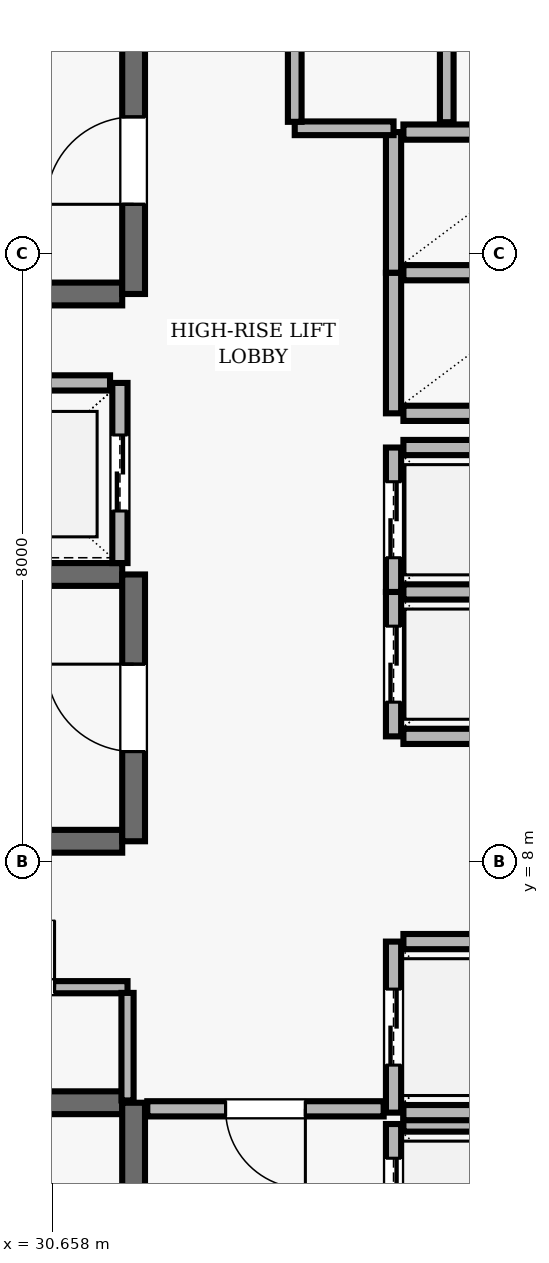
"""IFC4 building model, lengths in metres.
Left out: names, types, materials, properties, quantities, classifications, styles, units other than length and angle.
Written with IfcOpenShell. Run it as: python <this file> out.ifc"""

import sys

from ifc_helpers import new_model, si_unit, direction, frame, frame_2d, origin, place, context, subcontext, project, spatial, rectangle, extrude, element, fill, save


model = new_model("IFC4")
c1 = context("Model", 3, precision=1e-05, world=origin(), true_north=direction((0.0, 1.0)))
c2 = subcontext(c1, "Body", "Model", "MODEL_VIEW")
j1 = project(units=[si_unit("LENGTHUNIT", "METRE"), si_unit("PLANEANGLEUNIT", "RADIAN")], contexts=[c1])
p1 = place(None, origin())
s1 = spatial("IfcSite", under=j1, at=p1, CompositionType="ELEMENT")
p2 = place(p1, origin())
s2 = spatial("IfcBuilding", under=s1, at=p2, CompositionType="ELEMENT")
p3 = place(p2, frame((0.0, 0.0, 271.6)))
s3 = spatial("IfcBuildingStorey", under=s2, at=p3, CompositionType="ELEMENT", Elevation=271.6)
p4 = place(p3, frame((31.58, 4.83, 0.0), z_axis=(0.0, 0.0, 1.0), x_axis=(-1.0, 0.0, 0.0)))
e1 = element("IfcWall", 1, at=p4, inside=s3, PredefinedType="SHEAR", context=c2, shape_type="SweptSolid", body=[
    extrude(rectangle(XDim=8.36, YDim=0.3, at=frame_2d((4.18, 0.0))), origin(), (0.0, 0.0, 1.0), 3.69),
])
p5 = place(p3, frame((31.73, 0.96, 0.0), z_axis=(0.0, 0.0, 1.0), x_axis=(0.0, 1.0, 0.0)))
e2 = element("IfcWall", 2, at=p5, inside=s3, PredefinedType="SHEAR", context=c2, shape_type="SweptSolid", body=[
    extrude(rectangle(XDim=3.87, YDim=0.3, at=frame_2d((1.935, 0.0))), origin(), (0.0, 0.0, 1.0), 3.69),
])
p6 = place(p5, frame((1.54, 0.0, 0.0)))
e3 = element("IfcOpeningElement", 3, at=p6, cuts=e2, PredefinedType="OPENING", context=c2, shape_type="SweptSolid", body=[
    extrude(rectangle(XDim=1.15, YDim=2.15, at=frame_2d((0.575, 1.075))), frame((0.0, 0.16, 0.0), z_axis=(0.0, -1.0, 0.0), x_axis=(1.0, 0.0, 0.0)), (0.0, 0.0, 1.0), 0.32),
])
p7 = place(p3, frame((23.22, 15.47, 0.0), z_axis=(0.0, 0.0, 1.0), x_axis=(1.0, 0.0, 0.0)))
e4 = element("IfcWall", 4, at=p7, inside=s3, PredefinedType="SHEAR", context=c2, shape_type="SweptSolid", body=[
    extrude(rectangle(XDim=8.36, YDim=0.3, at=frame_2d((4.18, 0.0))), origin(), (0.0, 0.0, 1.0), 3.69),
])
p8 = place(p3, frame((31.73, 15.47, 0.0), z_axis=(0.0, 0.0, 1.0), x_axis=(0.0, 1.0, 0.0)))
e5 = element("IfcWall", 5, at=p8, inside=s3, PredefinedType="SHEAR", context=c2, shape_type="SweptSolid", body=[
    extrude(rectangle(XDim=3.51, YDim=0.3, at=frame_2d((1.755, 0.0))), origin(), (0.0, 0.0, 1.0), 3.69),
])
p9 = place(p8, frame((1.18, 0.0, 0.0)))
e6 = element("IfcOpeningElement", 6, at=p9, cuts=e5, PredefinedType="OPENING", context=c2, shape_type="SweptSolid", body=[
    extrude(rectangle(XDim=1.15, YDim=2.15, at=frame_2d((0.575, 1.075))), frame((0.0, 0.16, 0.0), z_axis=(0.0, -1.0, 0.0), x_axis=(1.0, 0.0, 0.0)), (0.0, 0.0, 1.0), 0.32),
])
for number, where, z_axis, x_axis in (
    (7, (31.58, 11.78, 0.0), (0.0, 0.0, 1.0), (-1.0, 0.0, 0.0)),
    (8, (23.22, 8.27, 0.0), (0.0, 0.0, 1.0), (1.0, 0.0, 0.0)),
):
    element("IfcWall", number, at=place(p3, frame(where, z_axis=z_axis, x_axis=x_axis)), inside=s3, PredefinedType="SHEAR", context=c2, shape_type="SweptSolid", body=[
        extrude(rectangle(XDim=8.36, YDim=0.3, at=frame_2d((4.18, 0.0))), origin(), (0.0, 0.0, 1.0), 3.69),
    ])
p10 = place(p3, frame((31.73, 8.27, 0.0), z_axis=(0.0, 0.0, 1.0), x_axis=(0.0, 1.0, 0.0)))
e9 = element("IfcWall", 9, at=p10, inside=s3, PredefinedType="SHEAR", context=c2, shape_type="SweptSolid", body=[
    extrude(rectangle(XDim=3.51, YDim=0.3, at=frame_2d((1.755, 0.0))), origin(), (0.0, 0.0, 1.0), 3.69),
])
p11 = place(p10, frame((1.18, 0.0, 0.0)))
e10 = element("IfcOpeningElement", 10, at=p11, cuts=e9, PredefinedType="OPENING", context=c2, shape_type="SweptSolid", body=[
    extrude(rectangle(XDim=1.15, YDim=2.15, at=frame_2d((0.575, 1.075))), frame((0.0, 0.16, 0.0), z_axis=(0.0, -1.0, 0.0), x_axis=(1.0, 0.0, 0.0)), (0.0, 0.0, 1.0), 0.32),
])
p12 = place(p3, frame((35.15, 4.55, 0.0), z_axis=(0.0, 0.0, 1.0), x_axis=(0.0, -1.0, 0.0)))
e11 = element("IfcWall", 11, at=p12, inside=s3, PredefinedType="SOLIDWALL", context=c2, shape_type="SweptSolid", body=[
    extrude(rectangle(XDim=2.1, YDim=0.2, at=frame_2d((1.05, 0.0))), origin(), (0.0, 0.0, 1.0), 3.69),
])
p13 = place(p12, frame((0.45, 0.0, 0.0)))
e12 = element("IfcOpeningElement", 12, at=p13, cuts=e11, PredefinedType="OPENING", context=c2, shape_type="SweptSolid", body=[
    extrude(rectangle(XDim=1.2, YDim=2.15, at=frame_2d((0.6, 1.075))), frame((0.0, 0.11, 0.0), z_axis=(0.0, -1.0, 0.0), x_axis=(1.0, 0.0, 0.0)), (0.0, 0.0, 1.0), 0.22),
])
p14 = place(p3, frame((37.42, 4.55, 0.0), z_axis=(0.0, 0.0, 1.0), x_axis=(-1.0, 0.0, 0.0)))
e13 = element("IfcWall", 13, at=p14, inside=s3, PredefinedType="SOLIDWALL", context=c2, shape_type="SweptSolid", body=[
    extrude(rectangle(XDim=2.14, YDim=0.2, at=frame_2d((1.07, 0.0))), origin(), (0.0, 0.0, 1.0), 3.69),
])
p15 = place(p3, frame((35.15, 6.95, 0.0), z_axis=(0.0, 0.0, 1.0), x_axis=(0.0, -1.0, 0.0)))
e14 = element("IfcWall", 14, at=p15, inside=s3, PredefinedType="SOLIDWALL", context=c2, shape_type="SweptSolid", body=[
    extrude(rectangle(XDim=2.25, YDim=0.2, at=frame_2d((1.125, 0.0))), origin(), (0.0, 0.0, 1.0), 3.69),
])
p16 = place(p15, frame((0.625, 0.0, 0.0)))
e15 = element("IfcOpeningElement", 15, at=p16, cuts=e14, PredefinedType="OPENING", context=c2, shape_type="SweptSolid", body=[
    extrude(rectangle(XDim=1.0, YDim=2.1, at=frame_2d((0.5, 1.05))), frame((0.0, 0.11, 0.0), z_axis=(0.0, -1.0, 0.0), x_axis=(1.0, 0.0, 0.0)), (0.0, 0.0, 1.0), 0.22),
])
for number, where, z_axis, x_axis in (
    (16, (35.28, 4.7, 0.0), (0.0, 0.0, 1.0), (1.0, 0.0, 0.0)),
    (17, (37.42, 6.95, 0.0), (0.0, 0.0, 1.0), (-1.0, 0.0, 0.0)),
):
    element("IfcWall", number, at=place(p3, frame(where, z_axis=z_axis, x_axis=x_axis)), inside=s3, PredefinedType="SOLIDWALL", context=c2, shape_type="SweptSolid", body=[
        extrude(rectangle(XDim=2.14, YDim=0.2, at=frame_2d((1.07, 0.0))), origin(), (0.0, 0.0, 1.0), 3.69),
    ])
p17 = place(p3, frame((35.15, 11.55, 0.0), z_axis=(0.0, 0.0, 1.0), x_axis=(0.0, -1.0, 0.0)))
e18 = element("IfcWall", 18, at=p17, inside=s3, PredefinedType="SOLIDWALL", context=c2, shape_type="SweptSolid", body=[
    extrude(rectangle(XDim=1.9, YDim=0.2, at=frame_2d((0.95, 0.0))), origin(), (0.0, 0.0, 1.0), 3.69),
])
p18 = place(p17, frame((0.45, 0.0, 0.0)))
e19 = element("IfcOpeningElement", 19, at=p18, cuts=e18, PredefinedType="OPENING", context=c2, shape_type="SweptSolid", body=[
    extrude(rectangle(XDim=1.0, YDim=2.1, at=frame_2d((0.5, 1.05))), frame((0.0, 0.11, 0.0), z_axis=(0.0, -1.0, 0.0), x_axis=(1.0, 0.0, 0.0)), (0.0, 0.0, 1.0), 0.22),
])
for number, where, z_axis, x_axis in (
    (20, (35.28, 9.65, 0.0), (0.0, 0.0, 1.0), (1.0, 0.0, 0.0)),
    (21, (37.42, 11.55, 0.0), (0.0, 0.0, 1.0), (-1.0, 0.0, 0.0)),
):
    element("IfcWall", number, at=place(p3, frame(where, z_axis=z_axis, x_axis=x_axis)), inside=s3, PredefinedType="SOLIDWALL", context=c2, shape_type="SweptSolid", body=[
        extrude(rectangle(XDim=2.14, YDim=0.2, at=frame_2d((1.07, 0.0))), origin(), (0.0, 0.0, 1.0), 3.69),
    ])
p19 = place(p3, frame((35.15, 13.45, 0.0), z_axis=(0.0, 0.0, 1.0), x_axis=(0.0, -1.0, 0.0)))
e22 = element("IfcWall", 22, at=p19, inside=s3, PredefinedType="SOLIDWALL", context=c2, shape_type="SweptSolid", body=[
    extrude(rectangle(XDim=1.9, YDim=0.2, at=frame_2d((0.95, 0.0))), origin(), (0.0, 0.0, 1.0), 3.69),
])
p20 = place(p19, frame((0.45, 0.0, 0.0)))
e23 = element("IfcOpeningElement", 23, at=p20, cuts=e22, PredefinedType="OPENING", context=c2, shape_type="SweptSolid", body=[
    extrude(rectangle(XDim=1.0, YDim=2.1, at=frame_2d((0.5, 1.05))), frame((0.0, 0.11, 0.0), z_axis=(0.0, -1.0, 0.0), x_axis=(1.0, 0.0, 0.0)), (0.0, 0.0, 1.0), 0.22),
])
p21 = place(p3, frame((37.42, 13.45, 0.0), z_axis=(0.0, 0.0, 1.0), x_axis=(-1.0, 0.0, 0.0)))
e24 = element("IfcWall", 24, at=p21, inside=s3, PredefinedType="SOLIDWALL", context=c2, shape_type="SweptSolid", body=[
    extrude(rectangle(XDim=2.14, YDim=0.2, at=frame_2d((1.07, 0.0))), origin(), (0.0, 0.0, 1.0), 3.69),
])
p22 = place(p3, frame((31.55, 11.93, 0.0), z_axis=(0.0, 0.0, 1.0), x_axis=(0.0, 1.0, 0.0)))
e25 = element("IfcWall", 25, at=p22, inside=s3, PredefinedType="SOLIDWALL", context=c2, shape_type="SweptSolid", body=[
    extrude(rectangle(XDim=2.37, YDim=0.2, at=frame_2d((1.185, 0.0))), origin(), (0.0, 0.0, 1.0), 3.69),
])
p23 = place(p22, frame((0.685, 0.0, 0.0)))
e26 = element("IfcOpeningElement", 26, at=p23, cuts=e25, PredefinedType="OPENING", context=c2, shape_type="SweptSolid", body=[
    extrude(rectangle(XDim=1.0, YDim=2.1, at=frame_2d((0.5, 1.05))), frame((0.0, 0.11, 0.0), z_axis=(0.0, -1.0, 0.0), x_axis=(1.0, 0.0, 0.0)), (0.0, 0.0, 1.0), 0.22),
])
p24 = place(p3, frame((31.42, 14.3, 0.0), z_axis=(0.0, 0.0, 1.0), x_axis=(-1.0, 0.0, 0.0)))
e27 = element("IfcWall", 27, at=p24, inside=s3, PredefinedType="SOLIDWALL", context=c2, shape_type="SweptSolid", body=[
    extrude(rectangle(XDim=2.44, YDim=0.2, at=frame_2d((1.22, 0.0))), origin(), (0.0, 0.0, 1.0), 3.69),
])
p25 = place(p3, frame((35.15, 15.75, 0.0), z_axis=(0.0, 0.0, 1.0), x_axis=(0.0, -1.0, 0.0)))
e28 = element("IfcWall", 28, at=p25, inside=s3, PredefinedType="SOLIDWALL", context=c2, shape_type="SweptSolid", body=[
    extrude(rectangle(XDim=1.85, YDim=0.2, at=frame_2d((0.925, 0.0))), origin(), (0.0, 0.0, 1.0), 3.69),
])
for number, where, z_axis, x_axis in (
    (29, (35.28, 13.9, 0.0), (0.0, 0.0, 1.0), (1.0, 0.0, 0.0)),
    (30, (37.42, 15.75, 0.0), (0.0, 0.0, 1.0), (-1.0, 0.0, 0.0)),
):
    element("IfcWall", number, at=place(p3, frame(where, z_axis=z_axis, x_axis=x_axis)), inside=s3, PredefinedType="SOLIDWALL", context=c2, shape_type="SweptSolid", body=[
        extrude(rectangle(XDim=2.14, YDim=0.2, at=frame_2d((1.07, 0.0))), origin(), (0.0, 0.0, 1.0), 3.69),
    ])
p26 = place(p3, frame((35.15, 17.6, 0.0), z_axis=(0.0, 0.0, 1.0), x_axis=(0.0, -1.0, 0.0)))
e31 = element("IfcWall", 31, at=p26, inside=s3, PredefinedType="SOLIDWALL", context=c2, shape_type="SweptSolid", body=[
    extrude(rectangle(XDim=1.85, YDim=0.2, at=frame_2d((0.925, 0.0))), origin(), (0.0, 0.0, 1.0), 3.69),
])
p27 = place(p3, frame((37.42, 17.6, 0.0), z_axis=(0.0, 0.0, 1.0), x_axis=(-1.0, 0.0, 0.0)))
e32 = element("IfcWall", 32, at=p27, inside=s3, PredefinedType="SOLIDWALL", context=c2, shape_type="SweptSolid", body=[
    extrude(rectangle(XDim=2.14, YDim=0.2, at=frame_2d((1.07, 0.0))), origin(), (0.0, 0.0, 1.0), 3.69),
])
p28 = place(p3, frame((28.85, 6.35, 0.0), z_axis=(0.0, 0.0, 1.0), x_axis=(1.0, 0.0, 0.0)))
e33 = element("IfcWall", 33, at=p28, inside=s3, PredefinedType="PARTITIONING", context=c2, shape_type="SweptSolid", body=[
    extrude(rectangle(XDim=2.8, YDim=0.16, at=frame_2d((1.4, 0.0))), origin(), (0.0, 0.0, 1.0), 3.69),
])
p29 = place(p28, frame((0.96, 0.0, 0.0)))
e34 = element("IfcOpeningElement", 34, at=p29, cuts=e33, PredefinedType="OPENING", context=c2, shape_type="SweptSolid", body=[
    extrude(rectangle(XDim=0.88, YDim=2.1, at=frame_2d((0.44, 1.05))), frame((0.0, 0.09, 0.0), z_axis=(0.0, -1.0, 0.0), x_axis=(1.0, 0.0, 0.0)), (0.0, 0.0, 1.0), 0.18),
])
p30 = place(p3, frame((33.85, 17.65, 0.0), z_axis=(0.0, 0.0, 1.0), x_axis=(1.0, 0.0, 0.0)))
e35 = element("IfcWall", 35, at=p30, inside=s3, PredefinedType="PARTITIONING", context=c2, shape_type="SweptSolid", body=[
    extrude(rectangle(XDim=1.3, YDim=0.18, at=frame_2d((0.65, 0.0))), origin(), (0.0, 0.0, 1.0), 3.69),
])
p31 = place(p3, frame((35.02, 4.75, 0.0), z_axis=(0.0, 0.0, 1.0), x_axis=(-1.0, 0.0, 0.0)))
e36 = element("IfcWall", 36, at=p31, inside=s3, PredefinedType="SOLIDWALL", context=c2, shape_type="SweptSolid", body=[
    extrude(rectangle(XDim=3.11, YDim=0.2, at=frame_2d((1.555, 0.0))), origin(), (0.0, 0.0, 1.0), 3.69),
])
p32 = place(p31, frame((1.03, 0.0, 0.0)))
e37 = element("IfcOpeningElement", 37, at=p32, cuts=e36, PredefinedType="OPENING", context=c2, shape_type="SweptSolid", body=[
    extrude(rectangle(XDim=1.05, YDim=2.15, at=frame_2d((0.525, 1.075))), frame((0.0, 0.11, 0.0), z_axis=(0.0, -1.0, 0.0), x_axis=(1.0, 0.0, 0.0)), (0.0, 0.0, 1.0), 0.22),
])
p33 = place(p3, frame((31.65, 4.86, 0.0), z_axis=(0.0, 0.0, 1.0), x_axis=(0.0, 1.0, 0.0)))
e38 = element("IfcWall", 38, at=p33, inside=s3, PredefinedType="PARTITIONING", context=c2, shape_type="SweptSolid", body=[
    extrude(rectangle(XDim=1.415, YDim=0.16, at=frame_2d((0.708, 0.0))), origin(), (0.0, 0.0, 1.0), 3.69),
])
p34 = place(p3, frame((33.85, 17.735, 0.0), z_axis=(0.0, 0.0, 1.0), x_axis=(0.0, 1.0, 0.0)))
e39 = element("IfcWall", 39, at=p34, inside=s3, PredefinedType="PARTITIONING", context=c2, shape_type="SweptSolid", body=[
    extrude(rectangle(XDim=6.03, YDim=0.18, at=frame_2d((3.015, 0.0))), origin(), (0.0, 0.0, 1.0), 3.69),
])
p35 = place(p34, frame((2.54, 0.0, 0.0)))
e40 = element("IfcOpeningElement", 40, at=p35, cuts=e39, PredefinedType="OPENING", context=c2, shape_type="SweptSolid", body=[
    extrude(rectangle(XDim=0.95, YDim=2.1, at=frame_2d((0.475, 1.05))), frame((0.0, 0.1, 0.0), z_axis=(0.0, -1.0, 0.0), x_axis=(1.0, 0.0, 0.0)), (0.0, 0.0, 1.0), 0.2),
])
p36 = place(p3, frame((35.85, 17.73, 0.0), z_axis=(0.0, 0.0, 1.0), x_axis=(0.0, 1.0, 0.0)))
e41 = element("IfcWall", 41, at=p36, inside=s3, PredefinedType="PARTITIONING", context=c2, shape_type="SweptSolid", body=[
    extrude(rectangle(XDim=3.412, YDim=0.18, at=frame_2d((1.706, 0.0))), origin(), (0.0, 0.0, 1.0), 3.69),
])
p37 = place(p36, frame((1.256, 0.0, 0.0)))
e42 = element("IfcOpeningElement", 42, at=p37, cuts=e41, PredefinedType="OPENING", context=c2, shape_type="SweptSolid", body=[
    extrude(rectangle(XDim=0.9, YDim=2.1, at=frame_2d((0.45, 1.05))), frame((0.0, 0.1, 0.0), z_axis=(0.0, -1.0, 0.0), x_axis=(1.0, 0.0, 0.0)), (0.0, 0.0, 1.0), 0.2),
])
p38 = place(p9, origin())
e43 = element("IfcDoor", 43, at=p38, inside=s3, OperationType="SINGLE_SWING_LEFT", PredefinedType="DOOR", context=c2, shape_type="SweptSolid", body=[
    extrude(rectangle(XDim=1.15, YDim=2.15, at=frame_2d((0.575, 1.075))), frame((0.0, 0.025, 0.0), z_axis=(0.0, -1.0, 0.0), x_axis=(1.0, 0.0, 0.0)), (0.0, 0.0, 1.0), 0.05),
])
fill(e6, e43)
p39 = place(p11, origin())
e44 = element("IfcDoor", 44, at=p39, inside=s3, OperationType="SINGLE_SWING_RIGHT", PredefinedType="DOOR", context=c2, shape_type="SweptSolid", body=[
    extrude(rectangle(XDim=1.15, YDim=2.15, at=frame_2d((0.575, 1.075))), frame((0.0, 0.025, 0.0), z_axis=(0.0, -1.0, 0.0), x_axis=(1.0, 0.0, 0.0)), (0.0, 0.0, 1.0), 0.05),
])
fill(e10, e44)
p40 = place(p13, origin())
e45 = element("IfcDoor", 45, at=p40, inside=s3, OperationType="DOUBLE_DOOR_SLIDING", PredefinedType="DOOR", context=c2, shape_type="SweptSolid", body=[
    extrude(rectangle(XDim=1.2, YDim=2.15, at=frame_2d((0.6, 1.075))), frame((0.0, 0.025, 0.0), z_axis=(0.0, -1.0, 0.0), x_axis=(1.0, 0.0, 0.0)), (0.0, 0.0, 1.0), 0.05),
])
fill(e12, e45)
p41 = place(p16, origin())
e46 = element("IfcDoor", 46, at=p41, inside=s3, OperationType="DOUBLE_DOOR_SLIDING", PredefinedType="DOOR", context=c2, shape_type="SweptSolid", body=[
    extrude(rectangle(XDim=1.0, YDim=2.1, at=frame_2d((0.5, 1.05))), frame((0.0, 0.025, 0.0), z_axis=(0.0, -1.0, 0.0), x_axis=(1.0, 0.0, 0.0)), (0.0, 0.0, 1.0), 0.05),
])
fill(e15, e46)
p42 = place(p18, origin())
e47 = element("IfcDoor", 47, at=p42, inside=s3, OperationType="DOUBLE_DOOR_SLIDING", PredefinedType="DOOR", context=c2, shape_type="SweptSolid", body=[
    extrude(rectangle(XDim=1.0, YDim=2.1, at=frame_2d((0.5, 1.05))), frame((0.0, 0.025, 0.0), z_axis=(0.0, -1.0, 0.0), x_axis=(1.0, 0.0, 0.0)), (0.0, 0.0, 1.0), 0.05),
])
fill(e19, e47)
p43 = place(p20, origin())
e48 = element("IfcDoor", 48, at=p43, inside=s3, OperationType="DOUBLE_DOOR_SLIDING", PredefinedType="DOOR", context=c2, shape_type="SweptSolid", body=[
    extrude(rectangle(XDim=1.0, YDim=2.1, at=frame_2d((0.5, 1.05))), frame((0.0, 0.025, 0.0), z_axis=(0.0, -1.0, 0.0), x_axis=(1.0, 0.0, 0.0)), (0.0, 0.0, 1.0), 0.05),
])
fill(e23, e48)
p44 = place(p23, origin())
e49 = element("IfcDoor", 49, at=p44, inside=s3, OperationType="DOUBLE_DOOR_SLIDING", PredefinedType="DOOR", context=c2, shape_type="SweptSolid", body=[
    extrude(rectangle(XDim=1.0, YDim=2.1, at=frame_2d((0.5, 1.05))), frame((0.0, 0.025, 0.0), z_axis=(0.0, -1.0, 0.0), x_axis=(1.0, 0.0, 0.0)), (0.0, 0.0, 1.0), 0.05),
])
fill(e26, e49)
p45 = place(p32, origin())
e50 = element("IfcDoor", 50, at=p45, inside=s3, OperationType="SINGLE_SWING_LEFT", PredefinedType="DOOR", context=c2, shape_type="SweptSolid", body=[
    extrude(rectangle(XDim=1.05, YDim=2.15, at=frame_2d((0.525, 1.075))), frame((0.0, 0.025, 0.0), z_axis=(0.0, -1.0, 0.0), x_axis=(1.0, 0.0, 0.0)), (0.0, 0.0, 1.0), 0.05),
])
fill(e37, e50)
p46 = place(p29, origin())
e51 = element("IfcDoor", 51, at=p46, inside=s3, OperationType="SINGLE_SWING_RIGHT", PredefinedType="DOOR", context=c2, shape_type="SweptSolid", body=[
    extrude(rectangle(XDim=0.88, YDim=2.1, at=frame_2d((0.44, 1.05))), frame((0.0, 0.025, 0.0), z_axis=(0.0, -1.0, 0.0), x_axis=(1.0, 0.0, 0.0)), (0.0, 0.0, 1.0), 0.05),
])
fill(e34, e51)
save(model, sys.argv[1])
